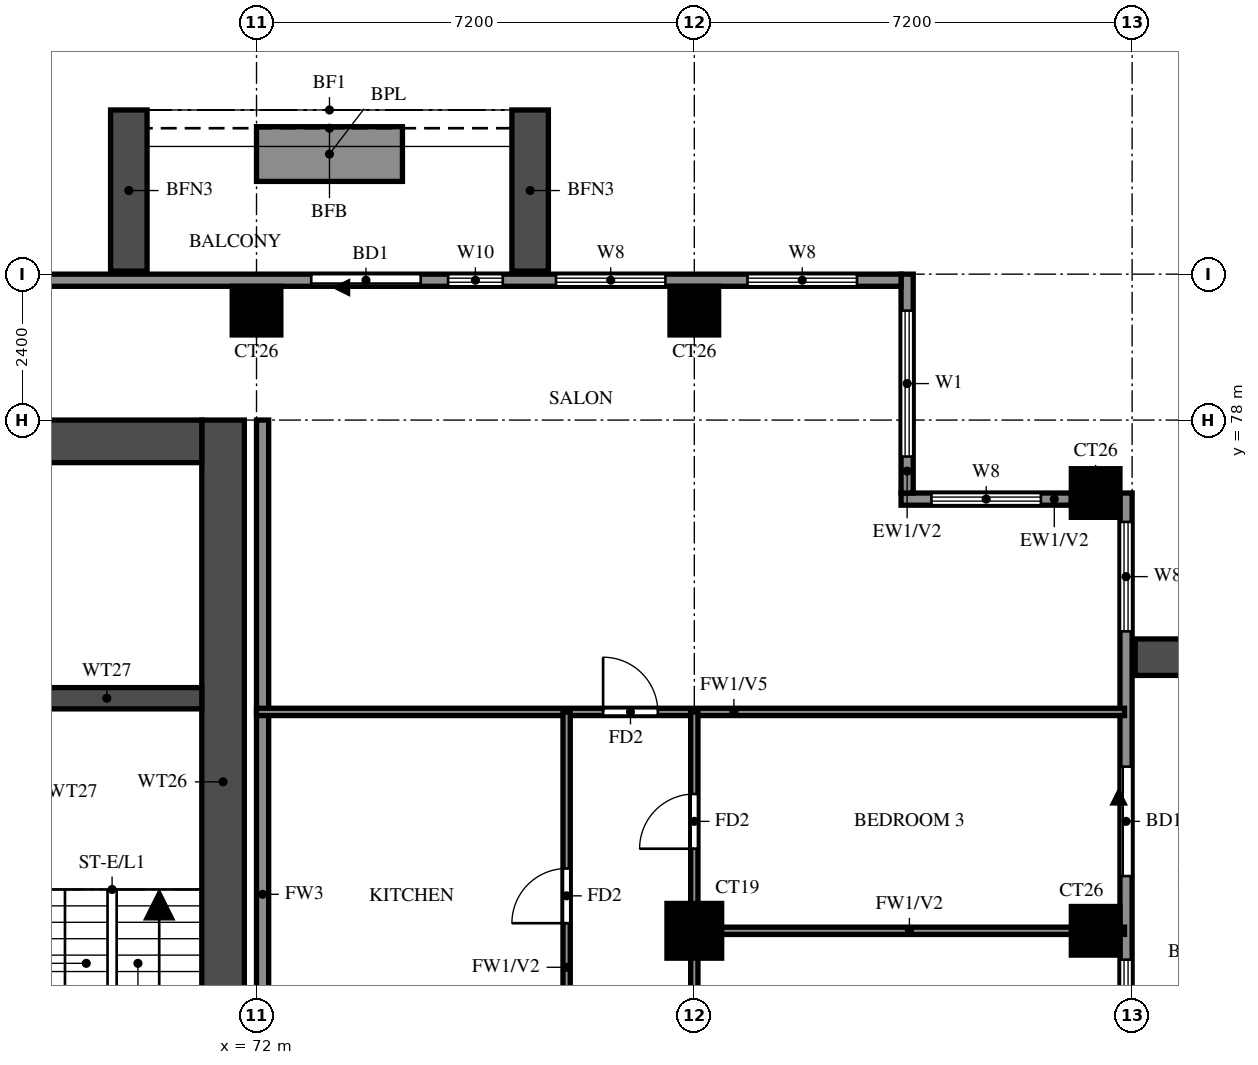
"""IFC4 building model, lengths in metres.
Left out: names, types, materials, properties, quantities, classifications, styles, units other than length and angle.
Written with IfcOpenShell. Run it as: python <this file> out.ifc"""

import sys

from ifc_helpers import new_model, si_unit, direction, frame, frame_2d, origin, origin_2d, place, context, subcontext, project, spatial, rectangle, extrude, source, transform, mapped, element, fill, save


model = new_model("IFC4")
c1 = context("Model", 3, precision=1e-05, world=origin(), true_north=direction((0.0, 1.0)))
c2 = subcontext(c1, "Body", "Model", "MODEL_VIEW")
j1 = project(units=[si_unit("LENGTHUNIT", "METRE"), si_unit("PLANEANGLEUNIT", "RADIAN")], contexts=[c1])
p1 = place(None, origin())
s1 = spatial("IfcSite", under=j1, at=p1, CompositionType="ELEMENT")
p2 = place(p1, origin())
s2 = spatial("IfcBuilding", under=s1, at=p2, CompositionType="ELEMENT")
p3 = place(p2, frame((0.0, 0.0, 185.0)))
s3 = spatial("IfcBuildingStorey", under=s2, at=p3, CompositionType="ELEMENT", Elevation=185.0)
m1 = source(origin(), c2, "Body", "SweptSolid", [
    extrude(rectangle(XDim=0.9, YDim=0.9, at=origin_2d()), origin(), (0.0, 0.0, 1.0), 3.2),
])
p4 = place(p3, frame((79.2, 69.6, 0.0), z_axis=(0.0, 0.0, 1.0), x_axis=(1.0, 0.0, 0.0)))
e1 = element("IfcColumn", 1, at=p4, inside=s3, PredefinedType="COLUMN", context=c2, shape_type="MappedRepresentation", body=[
    mapped(m1, transform((0.0, 0.0, 0.0))),
])
m2 = source(origin(), c2, "Body", "SweptSolid", [
    extrude(rectangle(XDim=0.8, YDim=0.8, at=origin_2d()), origin(), (0.0, 0.0, 1.0), 3.2),
])
for number, where, z_axis, x_axis in (
    (2, (85.8, 69.6, 0.0), (0.0, 0.0, 1.0), (1.0, 0.0, 0.0)),
    (3, (85.8, 76.8, 0.0), (0.0, 0.0, 1.0), (1.0, 0.0, 0.0)),
    (4, (72.0, 79.8, 0.0), (0.0, 0.0, 1.0), (1.0, 0.0, 0.0)),
    (5, (79.2, 79.8, 0.0), (0.0, 0.0, 1.0), (1.0, 0.0, 0.0)),
):
    element("IfcColumn", number, at=place(p3, frame(where, z_axis=z_axis, x_axis=x_axis)), inside=s3, PredefinedType="COLUMN", context=c2, shape_type="MappedRepresentation", body=[
        mapped(m2, transform((0.0, 0.0, 0.0))),
    ])
p5 = place(p3, frame((71.45, 66.1, 0.0), z_axis=(0.0, 0.0, 1.0), x_axis=(0.0, 1.0, 0.0)))
e6 = element("IfcWall", 6, at=p5, inside=s3, PredefinedType="SHEAR", context=c2, shape_type="SweptSolid", body=[
    extrude(rectangle(XDim=11.9, YDim=0.7, at=frame_2d((5.95, 0.0))), origin(), (0.0, 0.0, 1.0), 3.2),
])
p6 = place(p3, frame((29.7, 77.65, 0.0), z_axis=(0.0, 0.0, 1.0), x_axis=(1.0, 0.0, 0.0)))
e7 = element("IfcWall", 7, at=p6, inside=s3, PredefinedType="SHEAR", context=c2, shape_type="SweptSolid", body=[
    extrude(rectangle(XDim=41.4, YDim=0.7, at=frame_2d((20.7, 0.0))), origin(), (0.0, 0.0, 1.0), 3.2),
])
p7 = place(p3, frame((67.975, 73.425, 0.0), z_axis=(0.0, 0.0, 1.0), x_axis=(1.0, 0.0, 0.0)))
e8 = element("IfcWall", 8, at=p7, inside=s3, PredefinedType="SHEAR", context=c2, shape_type="SweptSolid", body=[
    extrude(rectangle(XDim=3.125, YDim=0.35, at=frame_2d((1.562, 0.0))), origin(), (0.0, 0.0, 1.0), 3.2),
])
p8 = place(p3, frame((86.3, 48.2, 0.0), z_axis=(0.0, 0.0, 1.0), x_axis=(0.0, 1.0, 0.0)))
e9 = element("IfcWall", 9, at=p8, inside=s3, PredefinedType="SOLIDWALL", context=c2, shape_type="SweptSolid", body=[
    extrude(rectangle(XDim=28.6, YDim=0.2, at=frame_2d((14.3, 0.0))), origin(), (0.0, 0.0, 1.0), 3.2),
])
p9 = place(p8, frame((7.9, 0.0, 0.0)))
e10 = element("IfcOpeningElement", 10, at=p9, cuts=e9, PredefinedType="OPENING", context=c2, shape_type="SweptSolid", body=[
    extrude(rectangle(XDim=1.8, YDim=2.4, at=frame_2d((0.9, 1.2))), frame((0.0, 0.11, 0.0), z_axis=(0.0, -1.0, 0.0), x_axis=(1.0, 0.0, 0.0)), (0.0, 0.0, 1.0), 0.22),
])
p10 = place(p8, frame((22.3, 0.0, 0.0)))
e11 = element("IfcOpeningElement", 11, at=p10, cuts=e9, PredefinedType="OPENING", context=c2, shape_type="SweptSolid", body=[
    extrude(rectangle(XDim=1.8, YDim=2.4, at=frame_2d((0.9, 1.2))), frame((0.0, 0.11, 0.0), z_axis=(0.0, -1.0, 0.0), x_axis=(1.0, 0.0, 0.0)), (0.0, 0.0, 1.0), 0.22),
])
p11 = place(p8, frame((0.6, 0.0, 0.6)))
e12 = element("IfcOpeningElement", 12, at=p11, cuts=e9, PredefinedType="OPENING", context=c2, shape_type="SweptSolid", body=[
    extrude(rectangle(XDim=2.4, YDim=2.4, at=frame_2d((1.2, 1.2))), frame((0.0, 0.11, 0.0), z_axis=(0.0, -1.0, 0.0), x_axis=(1.0, 0.0, 0.0)), (0.0, 0.0, 1.0), 0.22),
])
p12 = place(p8, frame((3.55, 0.0, 0.6)))
e13 = element("IfcOpeningElement", 13, at=p12, cuts=e9, PredefinedType="OPENING", context=c2, shape_type="SweptSolid", body=[
    extrude(rectangle(XDim=0.9, YDim=2.4, at=frame_2d((0.45, 1.2))), frame((0.0, 0.11, 0.0), z_axis=(0.0, -1.0, 0.0), x_axis=(1.0, 0.0, 0.0)), (0.0, 0.0, 1.0), 0.22),
])
p13 = place(p8, frame((5.325, 0.0, 0.6)))
e14 = element("IfcOpeningElement", 14, at=p13, cuts=e9, PredefinedType="OPENING", context=c2, shape_type="SweptSolid", body=[
    extrude(rectangle(XDim=1.2, YDim=2.4, at=frame_2d((0.6, 1.2))), frame((0.0, 0.11, 0.0), z_axis=(0.0, -1.0, 0.0), x_axis=(1.0, 0.0, 0.0)), (0.0, 0.0, 1.0), 0.22),
])
p14 = place(p8, frame((11.925, 0.0, 0.6)))
e15 = element("IfcOpeningElement", 15, at=p14, cuts=e9, PredefinedType="OPENING", context=c2, shape_type="SweptSolid", body=[
    extrude(rectangle(XDim=1.8, YDim=2.4, at=frame_2d((0.9, 1.2))), frame((0.0, 0.11, 0.0), z_axis=(0.0, -1.0, 0.0), x_axis=(1.0, 0.0, 0.0)), (0.0, 0.0, 1.0), 0.22),
])
p15 = place(p8, frame((14.975, 0.0, 0.6)))
e16 = element("IfcOpeningElement", 16, at=p15, cuts=e9, PredefinedType="OPENING", context=c2, shape_type="SweptSolid", body=[
    extrude(rectangle(XDim=2.4, YDim=2.4, at=frame_2d((1.2, 1.2))), frame((0.0, 0.11, 0.0), z_axis=(0.0, -1.0, 0.0), x_axis=(1.0, 0.0, 0.0)), (0.0, 0.0, 1.0), 0.22),
])
p16 = place(p8, frame((17.95, 0.0, 0.6)))
e17 = element("IfcOpeningElement", 17, at=p16, cuts=e9, PredefinedType="OPENING", context=c2, shape_type="SweptSolid", body=[
    extrude(rectangle(XDim=0.9, YDim=2.4, at=frame_2d((0.45, 1.2))), frame((0.0, 0.11, 0.0), z_axis=(0.0, -1.0, 0.0), x_axis=(1.0, 0.0, 0.0)), (0.0, 0.0, 1.0), 0.22),
])
p17 = place(p8, frame((19.725, 0.0, 0.6)))
e18 = element("IfcOpeningElement", 18, at=p17, cuts=e9, PredefinedType="OPENING", context=c2, shape_type="SweptSolid", body=[
    extrude(rectangle(XDim=1.2, YDim=2.4, at=frame_2d((0.6, 1.2))), frame((0.0, 0.11, 0.0), z_axis=(0.0, -1.0, 0.0), x_axis=(1.0, 0.0, 0.0)), (0.0, 0.0, 1.0), 0.22),
])
p18 = place(p8, frame((26.325, 0.0, 0.6)))
e19 = element("IfcOpeningElement", 19, at=p18, cuts=e9, PredefinedType="OPENING", context=c2, shape_type="SweptSolid", body=[
    extrude(rectangle(XDim=1.8, YDim=2.4, at=frame_2d((0.9, 1.2))), frame((0.0, 0.11, 0.0), z_axis=(0.0, -1.0, 0.0), x_axis=(1.0, 0.0, 0.0)), (0.0, 0.0, 1.0), 0.22),
])
p19 = place(p3, frame((85.4, 76.7, 0.0), z_axis=(0.0, 0.0, 1.0), x_axis=(-1.0, 0.0, 0.0)))
e20 = element("IfcWall", 20, at=p19, inside=s3, PredefinedType="SOLIDWALL", context=c2, shape_type="SweptSolid", body=[
    extrude(rectangle(XDim=2.8, YDim=0.2, at=frame_2d((1.4, 0.0))), origin(), (0.0, 0.0, 1.0), 3.2),
])
p20 = place(p19, frame((0.5, 0.0, 0.6)))
e21 = element("IfcOpeningElement", 21, at=p20, cuts=e20, PredefinedType="OPENING", context=c2, shape_type="SweptSolid", body=[
    extrude(rectangle(XDim=1.8, YDim=2.4, at=frame_2d((0.9, 1.2))), frame((0.0, 0.11, 0.0), z_axis=(0.0, -1.0, 0.0), x_axis=(1.0, 0.0, 0.0)), (0.0, 0.0, 1.0), 0.22),
])
p21 = place(p3, frame((82.7, 76.8, 0.0), z_axis=(0.0, 0.0, 1.0), x_axis=(0.0, 1.0, 0.0)))
e22 = element("IfcWall", 22, at=p21, inside=s3, PredefinedType="SOLIDWALL", context=c2, shape_type="SweptSolid", body=[
    extrude(rectangle(XDim=3.6, YDim=0.2, at=frame_2d((1.8, 0.0))), origin(), (0.0, 0.0, 1.0), 3.2),
])
p22 = place(p21, frame((0.6, 0.0, 0.6)))
e23 = element("IfcOpeningElement", 23, at=p22, cuts=e22, PredefinedType="OPENING", context=c2, shape_type="SweptSolid", body=[
    extrude(rectangle(XDim=2.4, YDim=2.4, at=frame_2d((1.2, 1.2))), frame((0.0, 0.11, 0.0), z_axis=(0.0, -1.0, 0.0), x_axis=(1.0, 0.0, 0.0)), (0.0, 0.0, 1.0), 0.22),
])
p23 = place(p3, frame((82.6, 80.3, 0.0), z_axis=(0.0, 0.0, 1.0), x_axis=(-1.0, 0.0, 0.0)))
e24 = element("IfcWall", 24, at=p23, inside=s3, PredefinedType="SOLIDWALL", context=c2, shape_type="SweptSolid", body=[
    extrude(rectangle(XDim=64.6, YDim=0.2, at=frame_2d((32.3, 0.0))), origin(), (0.0, 0.0, 1.0), 3.2),
])
p24 = place(p23, frame((7.9, 0.0, 0.0)))
e25 = element("IfcOpeningElement", 25, at=p24, cuts=e24, PredefinedType="OPENING", context=c2, shape_type="SweptSolid", body=[
    extrude(rectangle(XDim=1.8, YDim=2.4, at=frame_2d((0.9, 1.2))), frame((0.0, 0.11, 0.0), z_axis=(0.0, -1.0, 0.0), x_axis=(1.0, 0.0, 0.0)), (0.0, 0.0, 1.0), 0.22),
])
p25 = place(p23, frame((54.75, 0.0, 0.6)))
e26 = element("IfcOpeningElement", 26, at=p25, cuts=e24, PredefinedType="OPENING", context=c2, shape_type="SweptSolid", body=[
    extrude(rectangle(XDim=2.4, YDim=2.4, at=frame_2d((1.2, 1.2))), frame((0.0, 0.11, 0.0), z_axis=(0.0, -1.0, 0.0), x_axis=(1.0, 0.0, 0.0)), (0.0, 0.0, 1.0), 0.22),
])
p26 = place(p23, frame((57.65, 0.0, 0.6)))
e27 = element("IfcOpeningElement", 27, at=p26, cuts=e24, PredefinedType="OPENING", context=c2, shape_type="SweptSolid", body=[
    extrude(rectangle(XDim=2.4, YDim=2.4, at=frame_2d((1.2, 1.2))), frame((0.0, 0.11, 0.0), z_axis=(0.0, -1.0, 0.0), x_axis=(1.0, 0.0, 0.0)), (0.0, 0.0, 1.0), 0.22),
])
p27 = place(p23, frame((61.975, 0.0, 0.6)))
e28 = element("IfcOpeningElement", 28, at=p27, cuts=e24, PredefinedType="OPENING", context=c2, shape_type="SweptSolid", body=[
    extrude(rectangle(XDim=1.8, YDim=2.4, at=frame_2d((0.9, 1.2))), frame((0.0, 0.11, 0.0), z_axis=(0.0, -1.0, 0.0), x_axis=(1.0, 0.0, 0.0)), (0.0, 0.0, 1.0), 0.22),
])
p28 = place(p23, frame((0.725, 0.0, 0.6)))
e29 = element("IfcOpeningElement", 29, at=p28, cuts=e24, PredefinedType="OPENING", context=c2, shape_type="SweptSolid", body=[
    extrude(rectangle(XDim=1.8, YDim=2.4, at=frame_2d((0.9, 1.2))), frame((0.0, 0.11, 0.0), z_axis=(0.0, -1.0, 0.0), x_axis=(1.0, 0.0, 0.0)), (0.0, 0.0, 1.0), 0.22),
])
p29 = place(p23, frame((3.875, 0.0, 0.6)))
e30 = element("IfcOpeningElement", 30, at=p29, cuts=e24, PredefinedType="OPENING", context=c2, shape_type="SweptSolid", body=[
    extrude(rectangle(XDim=1.8, YDim=2.4, at=frame_2d((0.9, 1.2))), frame((0.0, 0.11, 0.0), z_axis=(0.0, -1.0, 0.0), x_axis=(1.0, 0.0, 0.0)), (0.0, 0.0, 1.0), 0.22),
])
p30 = place(p23, frame((6.55, 0.0, 0.6)))
e31 = element("IfcOpeningElement", 31, at=p30, cuts=e24, PredefinedType="OPENING", context=c2, shape_type="SweptSolid", body=[
    extrude(rectangle(XDim=0.9, YDim=2.4, at=frame_2d((0.45, 1.2))), frame((0.0, 0.11, 0.0), z_axis=(0.0, -1.0, 0.0), x_axis=(1.0, 0.0, 0.0)), (0.0, 0.0, 1.0), 0.22),
])
for number, where, z_axis, x_axis in (
    (32, (86.45, 74.1, 0.0), (0.0, 0.0, 1.0), (1.0, 0.0, 0.0)),
    (33, (76.5, 80.45, 0.0), (0.0, 0.0, 1.0), (0.0, 1.0, 0.0)),
    (34, (69.9, 80.45, 0.0), (0.0, 0.0, 1.0), (0.0, 1.0, 0.0)),
):
    element("IfcWall", number, at=place(p3, frame(where, z_axis=z_axis, x_axis=x_axis)), inside=s3, PredefinedType="SOLIDWALL", context=c2, shape_type="SweptSolid", body=[
        extrude(rectangle(XDim=2.65, YDim=0.6, at=frame_2d((1.325, 0.0))), origin(), (0.0, 0.0, 1.0), 2.85),
    ])
p31 = place(p3, frame((74.4, 82.375, 0.0), z_axis=(0.0, 0.0, 1.0), x_axis=(-1.0, 0.0, 0.0)))
e35 = element("IfcWall", 35, at=p31, inside=s3, PredefinedType="SOLIDWALL", context=c2, shape_type="SweptSolid", body=[
    extrude(rectangle(XDim=2.4, YDim=0.9, at=frame_2d((1.2, 0.0))), origin(), (0.0, 0.0, 1.0), 0.9),
])
p32 = place(p3, frame((72.1, 62.4, 0.0), z_axis=(0.0, 0.0, 1.0), x_axis=(0.0, 1.0, 0.0)))
e36 = element("IfcWall", 36, at=p32, inside=s3, PredefinedType="SOLIDWALL", context=c2, shape_type="SweptSolid", body=[
    extrude(rectangle(XDim=15.6, YDim=0.2, at=frame_2d((7.8, 0.0))), origin(), (0.0, 0.0, 1.0), 3.2),
])
p33 = place(p3, frame((79.2, 69.6, 0.0), z_axis=(0.0, 0.0, 1.0), x_axis=(1.0, 0.0, 0.0)))
e37 = element("IfcWall", 37, at=p33, inside=s3, PredefinedType="PARTITIONING", context=c2, shape_type="SweptSolid", body=[
    extrude(rectangle(XDim=7.075, YDim=0.12, at=frame_2d((3.538, 0.0))), origin(), (0.0, 0.0, 1.0), 3.2),
])
p34 = place(p3, frame((72.0, 73.2, 0.0), z_axis=(0.0, 0.0, 1.0), x_axis=(1.0, 0.0, 0.0)))
e38 = element("IfcWall", 38, at=p34, inside=s3, PredefinedType="PARTITIONING", context=c2, shape_type="SweptSolid", body=[
    extrude(rectangle(XDim=14.275, YDim=0.12, at=frame_2d((7.137, 0.0))), origin(), (0.0, 0.0, 1.0), 2.3),
])
p35 = place(p34, frame((5.7, 0.0, 0.0)))
e39 = element("IfcOpeningElement", 39, at=p35, cuts=e38, PredefinedType="OPENING", context=c2, shape_type="SweptSolid", body=[
    extrude(rectangle(XDim=0.9, YDim=2.1, at=frame_2d((0.45, 1.05))), frame((0.0, 0.07, 0.0), z_axis=(0.0, -1.0, 0.0), x_axis=(1.0, 0.0, 0.0)), (0.0, 0.0, 1.0), 0.14),
])
p36 = place(p3, frame((77.1, 64.8, 0.0), z_axis=(0.0, 0.0, 1.0), x_axis=(0.0, 1.0, 0.0)))
e40 = element("IfcWall", 40, at=p36, inside=s3, PredefinedType="PARTITIONING", context=c2, shape_type="SweptSolid", body=[
    extrude(rectangle(XDim=8.4, YDim=0.12, at=frame_2d((4.2, 0.0))), origin(), (0.0, 0.0, 1.0), 3.2),
])
p37 = place(p36, frame((4.925, 0.0, 0.0)))
e41 = element("IfcOpeningElement", 41, at=p37, cuts=e40, PredefinedType="OPENING", context=c2, shape_type="SweptSolid", body=[
    extrude(rectangle(XDim=0.9, YDim=2.1, at=frame_2d((0.45, 1.05))), frame((0.0, 0.07, 0.0), z_axis=(0.0, -1.0, 0.0), x_axis=(1.0, 0.0, 0.0)), (0.0, 0.0, 1.0), 0.14),
])
p38 = place(p3, frame((79.2, 48.125, 0.0), z_axis=(0.0, 0.0, 1.0), x_axis=(0.0, 1.0, 0.0)))
e42 = element("IfcWall", 42, at=p38, inside=s3, PredefinedType="PARTITIONING", context=c2, shape_type="SweptSolid", body=[
    extrude(rectangle(XDim=25.075, YDim=0.12, at=frame_2d((12.538, 0.0))), origin(), (0.0, 0.0, 1.0), 3.2),
])
p39 = place(p38, frame((1.288, 0.0, 0.0)))
e43 = element("IfcOpeningElement", 43, at=p39, cuts=e42, PredefinedType="OPENING", context=c2, shape_type="SweptSolid", body=[
    extrude(rectangle(XDim=0.9, YDim=2.1, at=frame_2d((0.45, 1.05))), frame((0.0, 0.07, 0.0), z_axis=(0.0, -1.0, 0.0), x_axis=(1.0, 0.0, 0.0)), (0.0, 0.0, 1.0), 0.14),
])
p40 = place(p38, frame((7.825, 0.0, 0.0)))
e44 = element("IfcOpeningElement", 44, at=p40, cuts=e42, PredefinedType="OPENING", context=c2, shape_type="SweptSolid", body=[
    extrude(rectangle(XDim=1.5, YDim=2.1, at=frame_2d((0.75, 1.05))), frame((0.0, 0.07, 0.0), z_axis=(0.0, -1.0, 0.0), x_axis=(1.0, 0.0, 0.0)), (0.0, 0.0, 1.0), 0.14),
])
p41 = place(p38, frame((12.025, 0.0, 0.0)))
e45 = element("IfcOpeningElement", 45, at=p41, cuts=e42, PredefinedType="OPENING", context=c2, shape_type="SweptSolid", body=[
    extrude(rectangle(XDim=0.9, YDim=2.1, at=frame_2d((0.45, 1.05))), frame((0.0, 0.07, 0.0), z_axis=(0.0, -1.0, 0.0), x_axis=(1.0, 0.0, 0.0)), (0.0, 0.0, 1.0), 0.14),
])
p42 = place(p38, frame((15.625, 0.0, 0.0)))
e46 = element("IfcOpeningElement", 46, at=p42, cuts=e42, PredefinedType="OPENING", context=c2, shape_type="SweptSolid", body=[
    extrude(rectangle(XDim=0.9, YDim=2.1, at=frame_2d((0.45, 1.05))), frame((0.0, 0.07, 0.0), z_axis=(0.0, -1.0, 0.0), x_axis=(1.0, 0.0, 0.0)), (0.0, 0.0, 1.0), 0.14),
])
p43 = place(p38, frame((19.225, 0.0, 0.0)))
e47 = element("IfcOpeningElement", 47, at=p43, cuts=e42, PredefinedType="OPENING", context=c2, shape_type="SweptSolid", body=[
    extrude(rectangle(XDim=0.9, YDim=2.1, at=frame_2d((0.45, 1.05))), frame((0.0, 0.07, 0.0), z_axis=(0.0, -1.0, 0.0), x_axis=(1.0, 0.0, 0.0)), (0.0, 0.0, 1.0), 0.14),
])
p44 = place(p38, frame((22.825, 0.0, 0.0)))
e48 = element("IfcOpeningElement", 48, at=p44, cuts=e42, PredefinedType="OPENING", context=c2, shape_type="SweptSolid", body=[
    extrude(rectangle(XDim=0.9, YDim=2.1, at=frame_2d((0.45, 1.05))), frame((0.0, 0.07, 0.0), z_axis=(0.0, -1.0, 0.0), x_axis=(1.0, 0.0, 0.0)), (0.0, 0.0, 1.0), 0.14),
])
p45 = place(p10, origin())
e49 = element("IfcDoor", 49, at=p45, inside=s3, OperationType="DOUBLE_DOOR_SLIDING", PredefinedType="DOOR", context=c2, shape_type="SweptSolid", body=[
    extrude(rectangle(XDim=1.8, YDim=2.4, at=frame_2d((0.9, 1.2))), frame((0.0, 0.025, 0.0), z_axis=(0.0, -1.0, 0.0), x_axis=(1.0, 0.0, 0.0)), (0.0, 0.0, 1.0), 0.05),
])
fill(e11, e49)
p46 = place(p17, origin())
e50 = element("IfcWindow", 50, at=p46, inside=s3, PartitioningType="SINGLE_PANEL", PredefinedType="WINDOW", context=c2, shape_type="SweptSolid", body=[
    extrude(rectangle(XDim=1.2, YDim=2.4, at=frame_2d((0.6, 1.2))), frame((0.0, 0.03, 0.0), z_axis=(0.0, -1.0, 0.0), x_axis=(1.0, 0.0, 0.0)), (0.0, 0.0, 1.0), 0.06),
])
fill(e18, e50)
p47 = place(p18, origin())
e51 = element("IfcWindow", 51, at=p47, inside=s3, PartitioningType="DOUBLE_PANEL_VERTICAL", PredefinedType="WINDOW", context=c2, shape_type="SweptSolid", body=[
    extrude(rectangle(XDim=1.8, YDim=2.4, at=frame_2d((0.9, 1.2))), frame((0.0, 0.03, 0.0), z_axis=(0.0, -1.0, 0.0), x_axis=(1.0, 0.0, 0.0)), (0.0, 0.0, 1.0), 0.06),
])
fill(e19, e51)
p48 = place(p20, origin())
e52 = element("IfcWindow", 52, at=p48, inside=s3, PartitioningType="DOUBLE_PANEL_VERTICAL", PredefinedType="WINDOW", context=c2, shape_type="SweptSolid", body=[
    extrude(rectangle(XDim=1.8, YDim=2.4, at=frame_2d((0.9, 1.2))), frame((0.0, 0.03, 0.0), z_axis=(0.0, -1.0, 0.0), x_axis=(1.0, 0.0, 0.0)), (0.0, 0.0, 1.0), 0.06),
])
fill(e21, e52)
p49 = place(p22, origin())
e53 = element("IfcWindow", 53, at=p49, inside=s3, PartitioningType="DOUBLE_PANEL_VERTICAL", PredefinedType="WINDOW", context=c2, shape_type="SweptSolid", body=[
    extrude(rectangle(XDim=2.4, YDim=2.4, at=frame_2d((1.2, 1.2))), frame((0.0, 0.03, 0.0), z_axis=(0.0, -1.0, 0.0), x_axis=(1.0, 0.0, 0.0)), (0.0, 0.0, 1.0), 0.06),
])
fill(e23, e53)
p50 = place(p24, origin())
e54 = element("IfcDoor", 54, at=p50, inside=s3, OperationType="DOUBLE_DOOR_SLIDING", PredefinedType="DOOR", context=c2, shape_type="SweptSolid", body=[
    extrude(rectangle(XDim=1.8, YDim=2.4, at=frame_2d((0.9, 1.2))), frame((0.0, 0.025, 0.0), z_axis=(0.0, -1.0, 0.0), x_axis=(1.0, 0.0, 0.0)), (0.0, 0.0, 1.0), 0.05),
])
fill(e25, e54)
p51 = place(p28, origin())
e55 = element("IfcWindow", 55, at=p51, inside=s3, PartitioningType="DOUBLE_PANEL_VERTICAL", PredefinedType="WINDOW", context=c2, shape_type="SweptSolid", body=[
    extrude(rectangle(XDim=1.8, YDim=2.4, at=frame_2d((0.9, 1.2))), frame((0.0, 0.03, 0.0), z_axis=(0.0, -1.0, 0.0), x_axis=(1.0, 0.0, 0.0)), (0.0, 0.0, 1.0), 0.06),
])
fill(e29, e55)
p52 = place(p29, origin())
e56 = element("IfcWindow", 56, at=p52, inside=s3, PartitioningType="DOUBLE_PANEL_VERTICAL", PredefinedType="WINDOW", context=c2, shape_type="SweptSolid", body=[
    extrude(rectangle(XDim=1.8, YDim=2.4, at=frame_2d((0.9, 1.2))), frame((0.0, 0.03, 0.0), z_axis=(0.0, -1.0, 0.0), x_axis=(1.0, 0.0, 0.0)), (0.0, 0.0, 1.0), 0.06),
])
fill(e30, e56)
p53 = place(p30, origin())
e57 = element("IfcWindow", 57, at=p53, inside=s3, PartitioningType="SINGLE_PANEL", PredefinedType="WINDOW", context=c2, shape_type="SweptSolid", body=[
    extrude(rectangle(XDim=0.9, YDim=2.4, at=frame_2d((0.45, 1.2))), frame((0.0, 0.03, 0.0), z_axis=(0.0, -1.0, 0.0), x_axis=(1.0, 0.0, 0.0)), (0.0, 0.0, 1.0), 0.06),
])
fill(e31, e57)
p54 = place(p44, origin())
e58 = element("IfcDoor", 58, at=p54, inside=s3, OperationType="SINGLE_SWING_LEFT", PredefinedType="DOOR", context=c2, shape_type="SweptSolid", body=[
    extrude(rectangle(XDim=0.9, YDim=2.1, at=frame_2d((0.45, 1.05))), frame((0.0, 0.025, 0.0), z_axis=(0.0, -1.0, 0.0), x_axis=(1.0, 0.0, 0.0)), (0.0, 0.0, 1.0), 0.05),
])
fill(e48, e58)
p55 = place(p35, origin())
e59 = element("IfcDoor", 59, at=p55, inside=s3, OperationType="SINGLE_SWING_RIGHT", PredefinedType="DOOR", context=c2, shape_type="SweptSolid", body=[
    extrude(rectangle(XDim=0.9, YDim=2.1, at=frame_2d((0.45, 1.05))), frame((0.0, 0.025, 0.0), z_axis=(0.0, -1.0, 0.0), x_axis=(1.0, 0.0, 0.0)), (0.0, 0.0, 1.0), 0.05),
])
fill(e39, e59)
p56 = place(p37, origin())
e60 = element("IfcDoor", 60, at=p56, inside=s3, OperationType="SINGLE_SWING_LEFT", PredefinedType="DOOR", context=c2, shape_type="SweptSolid", body=[
    extrude(rectangle(XDim=0.9, YDim=2.1, at=frame_2d((0.45, 1.05))), frame((0.0, 0.025, 0.0), z_axis=(0.0, -1.0, 0.0), x_axis=(1.0, 0.0, 0.0)), (0.0, 0.0, 1.0), 0.05),
])
fill(e41, e60)
save(model, sys.argv[1])
